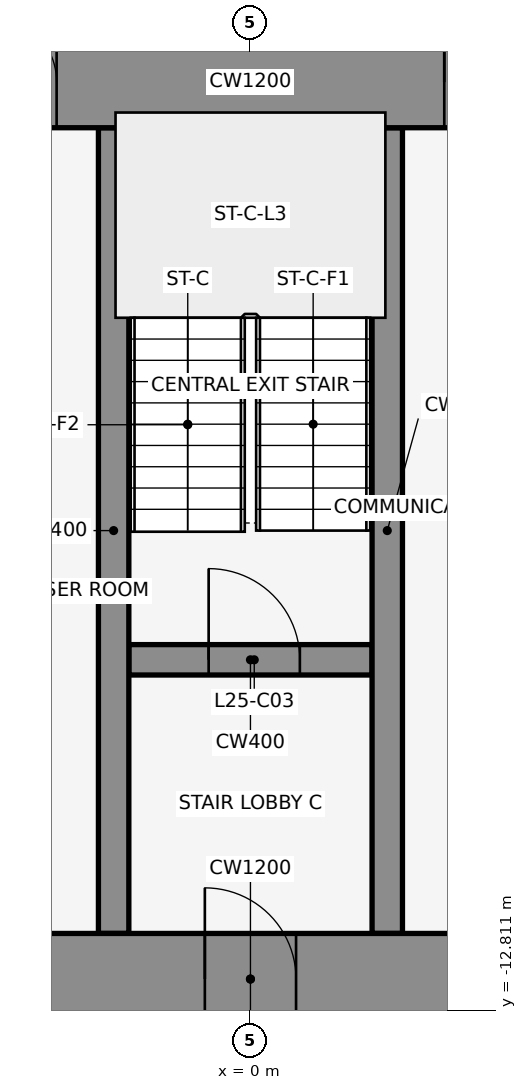
"""IFC4 building model, lengths in metres.
Left out: names, types, materials, properties, quantities, classifications, styles, units other than length and angle.
Written with IfcOpenShell. Run it as: python <this file> out.ifc"""

import sys

from ifc_helpers import new_model, si_unit, direction, frame, frame_2d, origin, place, context, subcontext, project, spatial, rectangle, extrude, element, fill, save


model = new_model("IFC4")
c1 = context("Model", 3, precision=1e-05, world=origin(), true_north=direction((0.0, 1.0)))
c2 = subcontext(c1, "Body", "Model", "MODEL_VIEW")
j1 = project(units=[si_unit("LENGTHUNIT", "METRE"), si_unit("PLANEANGLEUNIT", "RADIAN")], contexts=[c1])
p1 = place(None, origin())
s1 = spatial("IfcSite", under=j1, at=p1, CompositionType="ELEMENT")
p2 = place(p1, origin())
s2 = spatial("IfcBuilding", under=s1, at=p2, CompositionType="ELEMENT")
p3 = place(p2, frame((0.0, 0.0, 118.6)))
s3 = spatial("IfcBuildingStorey", under=s2, at=p3, CompositionType="ELEMENT", Elevation=118.6)
for number, where, z_axis, x_axis in (
    (1, (1.901, 1.08, 0.0), (0.0, 0.0, 1.0), (-0.84, -0.543, 0.0)),
    (2, (-0.068, -0.105, 0.0), (0.0, 0.0, 1.0), (-0.84, 0.543, 0.0)),
):
    element("IfcWall", number, at=place(p3, frame(where, z_axis=z_axis, x_axis=x_axis)), inside=s3, PredefinedType="STANDARD", context=c2, shape_type="SweptSolid", body=[
        extrude(rectangle(XDim=2.183, YDim=0.25, at=frame_2d((1.091, 0.0))), origin(), (0.0, 0.0, 1.0), 3.95),
    ])
p4 = place(p3, frame((-1.6, -8.2, 0.0), z_axis=(0.0, 0.0, 1.0), x_axis=(1.0, 0.0, 0.0)))
e3 = element("IfcWall", 3, at=p4, inside=s3, PredefinedType="SHEAR", context=c2, shape_type="SweptSolid", body=[
    extrude(rectangle(XDim=3.2, YDim=0.4, at=frame_2d((1.6, 0.0))), origin(), (0.0, 0.0, 1.0), 4.1),
])
p5 = place(p4, frame((1.05, 0.0, 0.0)))
e4 = element("IfcOpeningElement", 4, at=p5, cuts=e3, PredefinedType="OPENING", context=c2, shape_type="SweptSolid", body=[
    extrude(rectangle(XDim=1.2, YDim=2.1, at=frame_2d((0.6, 1.05))), frame((0.0, 0.212, 0.0), z_axis=(0.0, -1.0, 0.0), x_axis=(1.0, 0.0, 0.0)), (0.0, 0.0, 1.0), 0.424),
])
for number, where, z_axis, x_axis in (
    (5, (-1.8, -11.8, 0.0), (0.0, 0.0, 1.0), (0.0, 1.0, 0.0)),
    (6, (1.8, -11.8, 0.0), (0.0, 0.0, 1.0), (0.0, 1.0, 0.0)),
):
    element("IfcWall", number, at=place(p3, frame(where, z_axis=z_axis, x_axis=x_axis)), inside=s3, PredefinedType="SHEAR", context=c2, shape_type="SweptSolid", body=[
        extrude(rectangle(XDim=10.6, YDim=0.4, at=frame_2d((5.3, 0.0))), origin(), (0.0, 0.0, 1.0), 4.1),
    ])
p6 = place(p3, frame((-22.0, -0.6, 0.0), z_axis=(0.0, 0.0, 1.0), x_axis=(1.0, 0.0, 0.0)))
e7 = element("IfcWall", 7, at=p6, inside=s3, PredefinedType="SHEAR", context=c2, shape_type="SweptSolid", body=[
    extrude(rectangle(XDim=44.0, YDim=1.2, at=frame_2d((22.0, 0.0))), origin(), (0.0, 0.0, 1.0), 4.1),
])
p7 = place(p6, frame((18.55, 0.0, 0.0)))
e8 = element("IfcOpeningElement", 8, at=p7, cuts=e7, PredefinedType="OPENING", context=c2, shape_type="SweptSolid", body=[
    extrude(rectangle(XDim=0.9, YDim=2.1, at=frame_2d((0.45, 1.05))), frame((0.0, 0.612, 0.0), z_axis=(0.0, -1.0, 0.0), x_axis=(1.0, 0.0, 0.0)), (0.0, 0.0, 1.0), 1.224),
])
p8 = place(p6, frame((24.55, 0.0, 0.0)))
e9 = element("IfcOpeningElement", 9, at=p8, cuts=e7, PredefinedType="OPENING", context=c2, shape_type="SweptSolid", body=[
    extrude(rectangle(XDim=0.9, YDim=2.1, at=frame_2d((0.45, 1.05))), frame((0.0, 0.612, 0.0), z_axis=(0.0, -1.0, 0.0), x_axis=(1.0, 0.0, 0.0)), (0.0, 0.0, 1.0), 1.224),
])
p9 = place(p3, frame((-22.0, -12.4, 0.0), z_axis=(0.0, 0.0, 1.0), x_axis=(1.0, 0.0, 0.0)))
e10 = element("IfcWall", 10, at=p9, inside=s3, PredefinedType="SHEAR", context=c2, shape_type="SweptSolid", body=[
    extrude(rectangle(XDim=44.0, YDim=1.2, at=frame_2d((22.0, 0.0))), origin(), (0.0, 0.0, 1.0), 4.1),
])
p10 = place(p9, frame((2.2, 0.0, 0.0)))
e11 = element("IfcOpeningElement", 11, at=p10, cuts=e10, PredefinedType="OPENING", context=c2, shape_type="SweptSolid", body=[
    extrude(rectangle(XDim=1.2, YDim=2.1, at=frame_2d((0.6, 1.05))), frame((0.0, 0.612, 0.0), z_axis=(0.0, -1.0, 0.0), x_axis=(1.0, 0.0, 0.0)), (0.0, 0.0, 1.0), 1.224),
])
p11 = place(p9, frame((21.4, 0.0, 0.0)))
e12 = element("IfcOpeningElement", 12, at=p11, cuts=e10, PredefinedType="OPENING", context=c2, shape_type="SweptSolid", body=[
    extrude(rectangle(XDim=1.2, YDim=2.1, at=frame_2d((0.6, 1.05))), frame((0.0, 0.612, 0.0), z_axis=(0.0, -1.0, 0.0), x_axis=(1.0, 0.0, 0.0)), (0.0, 0.0, 1.0), 1.224),
])
p12 = place(p9, frame((40.6, 0.0, 0.0)))
e13 = element("IfcOpeningElement", 13, at=p12, cuts=e10, PredefinedType="OPENING", context=c2, shape_type="SweptSolid", body=[
    extrude(rectangle(XDim=1.2, YDim=2.1, at=frame_2d((0.6, 1.05))), frame((0.0, 0.612, 0.0), z_axis=(0.0, -1.0, 0.0), x_axis=(1.0, 0.0, 0.0)), (0.0, 0.0, 1.0), 1.224),
])
p13 = place(p9, frame((16.0, 0.0, 0.0)))
e14 = element("IfcOpeningElement", 14, at=p13, cuts=e10, PredefinedType="OPENING", context=c2, shape_type="SweptSolid", body=[
    extrude(rectangle(XDim=1.8, YDim=2.1, at=frame_2d((0.9, 1.05))), frame((0.0, 0.612, 0.0), z_axis=(0.0, -1.0, 0.0), x_axis=(1.0, 0.0, 0.0)), (0.0, 0.0, 1.0), 1.224),
])
p14 = place(p9, frame((6.3, 0.0, 0.0)))
e15 = element("IfcOpeningElement", 15, at=p14, cuts=e10, PredefinedType="OPENING", context=c2, shape_type="SweptSolid", body=[
    extrude(rectangle(XDim=1.2, YDim=2.1, at=frame_2d((0.6, 1.05))), frame((0.0, 0.612, 0.0), z_axis=(0.0, -1.0, 0.0), x_axis=(1.0, 0.0, 0.0)), (0.0, 0.0, 1.0), 1.224),
])
p15 = place(p9, frame((26.2, 0.0, 0.0)))
e16 = element("IfcOpeningElement", 16, at=p15, cuts=e10, PredefinedType="OPENING", context=c2, shape_type="SweptSolid", body=[
    extrude(rectangle(XDim=1.8, YDim=2.1, at=frame_2d((0.9, 1.05))), frame((0.0, 0.612, 0.0), z_axis=(0.0, -1.0, 0.0), x_axis=(1.0, 0.0, 0.0)), (0.0, 0.0, 1.0), 1.224),
])
p16 = place(p9, frame((36.5, 0.0, 0.0)))
e17 = element("IfcOpeningElement", 17, at=p16, cuts=e10, PredefinedType="OPENING", context=c2, shape_type="SweptSolid", body=[
    extrude(rectangle(XDim=1.2, YDim=2.1, at=frame_2d((0.6, 1.05))), frame((0.0, 0.612, 0.0), z_axis=(0.0, -1.0, 0.0), x_axis=(1.0, 0.0, 0.0)), (0.0, 0.0, 1.0), 1.224),
])
p17 = place(p5, origin())
e18 = element("IfcDoor", 18, at=p17, inside=s3, OperationType="SINGLE_SWING_LEFT", PredefinedType="DOOR", context=c2, shape_type="SweptSolid", body=[
    extrude(rectangle(XDim=1.2, YDim=2.1, at=frame_2d((0.6, 1.05))), frame((0.0, 0.025, 0.0), z_axis=(0.0, -1.0, 0.0), x_axis=(1.0, 0.0, 0.0)), (0.0, 0.0, 1.0), 0.05),
])
fill(e4, e18)
p18 = place(p7, origin())
e19 = element("IfcDoor", 19, at=p18, inside=s3, OperationType="SINGLE_SWING_LEFT", PredefinedType="DOOR", context=c2, shape_type="SweptSolid", body=[
    extrude(rectangle(XDim=0.9, YDim=2.1, at=frame_2d((0.45, 1.05))), frame((0.0, 0.025, 0.0), z_axis=(0.0, -1.0, 0.0), x_axis=(1.0, 0.0, 0.0)), (0.0, 0.0, 1.0), 0.05),
])
fill(e8, e19)
p19 = place(p8, origin())
e20 = element("IfcDoor", 20, at=p19, inside=s3, OperationType="SINGLE_SWING_LEFT", PredefinedType="DOOR", context=c2, shape_type="SweptSolid", body=[
    extrude(rectangle(XDim=0.9, YDim=2.1, at=frame_2d((0.45, 1.05))), frame((0.0, 0.025, 0.0), z_axis=(0.0, -1.0, 0.0), x_axis=(1.0, 0.0, 0.0)), (0.0, 0.0, 1.0), 0.05),
])
fill(e9, e20)
p20 = place(p11, frame((1.2, 0.0, 0.0), z_axis=(0.0, 0.0, 1.0), x_axis=(-1.0, 0.0, 0.0)))
e21 = element("IfcDoor", 21, at=p20, inside=s3, OperationType="SINGLE_SWING_RIGHT", PredefinedType="DOOR", context=c2, shape_type="SweptSolid", body=[
    extrude(rectangle(XDim=1.2, YDim=2.1, at=frame_2d((0.6, 1.05))), frame((0.0, 0.025, 0.0), z_axis=(0.0, -1.0, 0.0), x_axis=(1.0, 0.0, 0.0)), (0.0, 0.0, 1.0), 0.05),
])
fill(e12, e21)
save(model, sys.argv[1])
